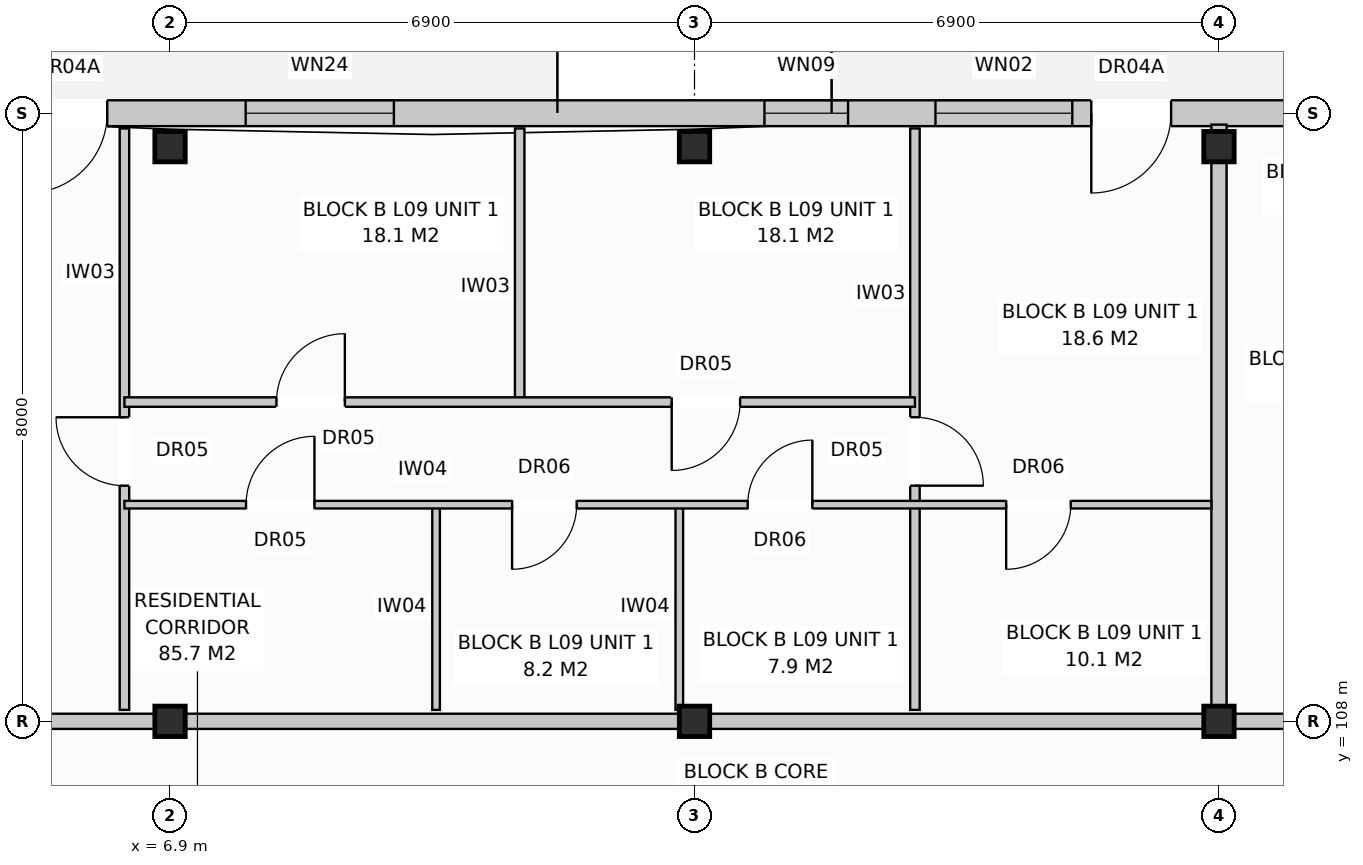
"""IFC4 building model, lengths in metres.
Left out: names, types, materials, properties, quantities, classifications, styles, units other than length and angle.
Written with IfcOpenShell. Run it as: python <this file> out.ifc"""

import sys

from ifc_helpers import new_model, si_unit, direction, frame, frame_2d, origin, origin_with_axes, origin_2d, place, context, subcontext, project, spatial, rectangle, extrude, element, fill, save


model = new_model("IFC4")
c1 = context("Model", 3, precision=1e-05, world=origin(), true_north=direction((0.0, 1.0)))
c2 = subcontext(c1, "Body", "Model", "MODEL_VIEW")
j1 = project(units=[si_unit("LENGTHUNIT", "METRE"), si_unit("PLANEANGLEUNIT", "RADIAN")], contexts=[c1])
p1 = place(None, origin())
s1 = spatial("IfcSite", under=j1, at=p1, CompositionType="ELEMENT")
p2 = place(p1, origin())
s2 = spatial("IfcBuilding", under=s1, at=p2, CompositionType="ELEMENT")
p3 = place(p2, frame((0.0, 0.0, 30.4)))
s3 = spatial("IfcBuildingStorey", under=s2, at=p3, CompositionType="ELEMENT", Elevation=30.4)
for number, where, z_axis, x_axis in (
    (1, (6.9, 108.0, 0.0), (0.0, 0.0, 1.0), (1.0, 0.0, 0.0)),
    (2, (6.9, 115.56, 0.0), (0.0, 0.0, 1.0), (1.0, 0.0, 0.0)),
    (3, (13.8, 108.0, 0.0), (0.0, 0.0, 1.0), (1.0, 0.0, 0.0)),
    (4, (13.8, 115.56, 0.0), (0.0, 0.0, 1.0), (1.0, 0.0, 0.0)),
    (5, (20.7, 108.0, 0.0), (0.0, 0.0, 1.0), (1.0, 0.0, 0.0)),
    (6, (20.7, 115.56, 0.0), (0.0, 0.0, 1.0), (1.0, 0.0, 0.0)),
):
    element("IfcColumn", number, at=place(p3, frame(where, z_axis=z_axis, x_axis=x_axis)), inside=s3, PredefinedType="COLUMN", context=c2, shape_type="SweptSolid", body=[
        extrude(rectangle(XDim=0.4, YDim=0.4, at=origin_2d()), origin(), (0.0, 0.0, 1.0), 3.2),
    ])
p4 = place(p3, frame((0.16, 116.0, 0.0), z_axis=(0.0, 0.0, 1.0), x_axis=(1.0, 0.0, 0.0)))
e7 = element("IfcWall", 7, at=p4, inside=s3, PredefinedType="STANDARD", context=c2, shape_type="SweptSolid", body=[
    extrude(rectangle(XDim=41.08, YDim=0.34, at=frame_2d((20.54, 0.0))), origin(), (0.0, 0.0, 1.0), 2.96),
])
p5 = place(p4, frame((4.864, 0.0, 0.0)))
e8 = element("IfcOpeningElement", 8, at=p5, cuts=e7, PredefinedType="OPENING", context=c2, shape_type="SweptSolid", body=[
    extrude(rectangle(XDim=1.05, YDim=2.12, at=frame_2d((0.525, 1.06))), frame((0.0, 0.182, 0.0), z_axis=(0.0, -1.0, 0.0), x_axis=(1.0, 0.0, 0.0)), (0.0, 0.0, 1.0), 0.364),
])
p6 = place(p4, frame((18.86, 0.0, 0.0)))
e9 = element("IfcOpeningElement", 9, at=p6, cuts=e7, PredefinedType="OPENING", context=c2, shape_type="SweptSolid", body=[
    extrude(rectangle(XDim=1.05, YDim=2.12, at=frame_2d((0.525, 1.06))), frame((0.0, 0.182, 0.0), z_axis=(0.0, -1.0, 0.0), x_axis=(1.0, 0.0, 0.0)), (0.0, 0.0, 1.0), 0.364),
])
p7 = place(p4, frame((30.364, 0.0, 0.0)))
e10 = element("IfcOpeningElement", 10, at=p7, cuts=e7, PredefinedType="OPENING", context=c2, shape_type="SweptSolid", body=[
    extrude(rectangle(XDim=1.05, YDim=2.12, at=frame_2d((0.525, 1.06))), frame((0.0, 0.182, 0.0), z_axis=(0.0, -1.0, 0.0), x_axis=(1.0, 0.0, 0.0)), (0.0, 0.0, 1.0), 0.364),
])
p8 = place(p4, frame((2.46, 0.0, 0.72)))
e11 = element("IfcOpeningElement", 11, at=p8, cuts=e7, PredefinedType="OPENING", context=c2, shape_type="SweptSolid", body=[
    extrude(rectangle(XDim=1.1, YDim=1.5, at=frame_2d((0.55, 0.75))), frame((0.0, 0.182, 0.0), z_axis=(0.0, -1.0, 0.0), x_axis=(1.0, 0.0, 0.0)), (0.0, 0.0, 1.0), 0.364),
])
p9 = place(p4, frame((7.735, 0.0, 0.8)))
e12 = element("IfcOpeningElement", 12, at=p9, cuts=e7, PredefinedType="OPENING", context=c2, shape_type="SweptSolid", body=[
    extrude(rectangle(XDim=1.95, YDim=1.65, at=frame_2d((0.975, 0.825))), frame((0.0, 0.182, 0.0), z_axis=(0.0, -1.0, 0.0), x_axis=(1.0, 0.0, 0.0)), (0.0, 0.0, 1.0), 0.364),
])
p10 = place(p4, frame((14.56, 0.0, 0.72)))
e13 = element("IfcOpeningElement", 13, at=p10, cuts=e7, PredefinedType="OPENING", context=c2, shape_type="SweptSolid", body=[
    extrude(rectangle(XDim=1.1, YDim=1.5, at=frame_2d((0.55, 0.75))), frame((0.0, 0.182, 0.0), z_axis=(0.0, -1.0, 0.0), x_axis=(1.0, 0.0, 0.0)), (0.0, 0.0, 1.0), 0.364),
])
p11 = place(p4, frame((16.81, 0.0, 0.8)))
e14 = element("IfcOpeningElement", 14, at=p11, cuts=e7, PredefinedType="OPENING", context=c2, shape_type="SweptSolid", body=[
    extrude(rectangle(XDim=1.8, YDim=1.7, at=frame_2d((0.9, 0.85))), frame((0.0, 0.182, 0.0), z_axis=(0.0, -1.0, 0.0), x_axis=(1.0, 0.0, 0.0)), (0.0, 0.0, 1.0), 0.364),
])
p12 = place(p4, frame((21.535, 0.0, 0.8)))
e15 = element("IfcOpeningElement", 15, at=p12, cuts=e7, PredefinedType="OPENING", context=c2, shape_type="SweptSolid", body=[
    extrude(rectangle(XDim=1.95, YDim=1.65, at=frame_2d((0.975, 0.825))), frame((0.0, 0.182, 0.0), z_axis=(0.0, -1.0, 0.0), x_axis=(1.0, 0.0, 0.0)), (0.0, 0.0, 1.0), 0.364),
])
p13 = place(p4, frame((25.36, 0.0, 0.72)))
e16 = element("IfcOpeningElement", 16, at=p13, cuts=e7, PredefinedType="OPENING", context=c2, shape_type="SweptSolid", body=[
    extrude(rectangle(XDim=1.1, YDim=1.5, at=frame_2d((0.55, 0.75))), frame((0.0, 0.182, 0.0), z_axis=(0.0, -1.0, 0.0), x_axis=(1.0, 0.0, 0.0)), (0.0, 0.0, 1.0), 0.364),
])
p14 = place(p4, frame((28.66, 0.0, 0.72)))
e17 = element("IfcOpeningElement", 17, at=p14, cuts=e7, PredefinedType="OPENING", context=c2, shape_type="SweptSolid", body=[
    extrude(rectangle(XDim=1.1, YDim=1.5, at=frame_2d((0.55, 0.75))), frame((0.0, 0.182, 0.0), z_axis=(0.0, -1.0, 0.0), x_axis=(1.0, 0.0, 0.0)), (0.0, 0.0, 1.0), 0.364),
])
p15 = place(p4, frame((31.935, 0.0, 0.8)))
e18 = element("IfcOpeningElement", 18, at=p15, cuts=e7, PredefinedType="OPENING", context=c2, shape_type="SweptSolid", body=[
    extrude(rectangle(XDim=1.95, YDim=1.65, at=frame_2d((0.975, 0.825))), frame((0.0, 0.182, 0.0), z_axis=(0.0, -1.0, 0.0), x_axis=(1.0, 0.0, 0.0)), (0.0, 0.0, 1.0), 0.364),
])
p16 = place(p4, frame((38.06, 0.0, 0.72)))
e19 = element("IfcOpeningElement", 19, at=p16, cuts=e7, PredefinedType="OPENING", context=c2, shape_type="SweptSolid", body=[
    extrude(rectangle(XDim=1.1, YDim=1.5, at=frame_2d((0.55, 0.75))), frame((0.0, 0.182, 0.0), z_axis=(0.0, -1.0, 0.0), x_axis=(1.0, 0.0, 0.0)), (0.0, 0.0, 1.0), 0.364),
])
p17 = place(p3, frame((20.7, 108.15, 0.0), z_axis=(0.0, 0.0, 1.0), x_axis=(0.0, 1.0, 0.0)))
e20 = element("IfcWall", 20, at=p17, inside=s3, PredefinedType="PARTITIONING", context=c2, shape_type="SweptSolid", body=[
    extrude(rectangle(XDim=7.7, YDim=0.2, at=frame_2d((3.85, 0.0))), origin(), (0.0, 0.0, 1.0), 2.96),
])
p18 = place(p3, frame((0.0, 108.0, 0.0), z_axis=(0.0, 0.0, 1.0), x_axis=(1.0, 0.0, 0.0)))
e21 = element("IfcWall", 21, at=p18, inside=s3, PredefinedType="PARTITIONING", context=c2, shape_type="SweptSolid", body=[
    extrude(rectangle(XDim=20.7, YDim=0.2, at=frame_2d((10.35, 0.0))), origin(), (0.0, 0.0, 1.0), 2.4),
])
p19 = place(p18, frame((2.4, 0.0, 0.0)))
e22 = element("IfcOpeningElement", 22, at=p19, cuts=e21, PredefinedType="OPENING", context=c2, shape_type="SweptSolid", body=[
    extrude(rectangle(XDim=0.95, YDim=2.15, at=frame_2d((0.475, 1.075))), frame((0.0, 0.112, 0.0), z_axis=(0.0, -1.0, 0.0), x_axis=(1.0, 0.0, 0.0)), (0.0, 0.0, 1.0), 0.224),
])
p20 = place(p3, frame((6.3, 108.15, 0.0), z_axis=(0.0, 0.0, 1.0), x_axis=(0.0, 1.0, 0.0)))
e23 = element("IfcWall", 23, at=p20, inside=s3, PredefinedType="PARTITIONING", context=c2, shape_type="SweptSolid", body=[
    extrude(rectangle(XDim=7.65, YDim=0.125, at=frame_2d((3.825, 0.0))), origin(), (0.0, 0.0, 1.0), 2.96),
])
p21 = place(p20, frame((2.95, 0.0, 0.0)))
e24 = element("IfcOpeningElement", 24, at=p21, cuts=e23, PredefinedType="OPENING", context=c2, shape_type="SweptSolid", body=[
    extrude(rectangle(XDim=0.9, YDim=2.1, at=frame_2d((0.45, 1.05))), frame((0.0, 0.074, 0.0), z_axis=(0.0, -1.0, 0.0), x_axis=(1.0, 0.0, 0.0)), (0.0, 0.0, 1.0), 0.149),
])
for number, where, z_axis, x_axis in (
    (25, (10.4, 108.15, 0.0), (0.0, 0.0, 1.0), (0.0, 1.0, 0.0)),
    (26, (13.6, 108.15, 0.0), (0.0, 0.0, 1.0), (0.0, 1.0, 0.0)),
):
    element("IfcWall", number, at=place(p3, frame(where, z_axis=z_axis, x_axis=x_axis)), inside=s3, PredefinedType="PARTITIONING", context=c2, shape_type="SweptSolid", body=[
        extrude(rectangle(XDim=2.7, YDim=0.1, at=frame_2d((1.35, 0.0))), origin(), (0.0, 0.0, 1.0), 2.96),
    ])
p22 = place(p3, frame((11.5, 112.2, 0.0), z_axis=(0.0, 0.0, 1.0), x_axis=(0.0, 1.0, 0.0)))
e27 = element("IfcWall", 27, at=p22, inside=s3, PredefinedType="PARTITIONING", context=c2, shape_type="SweptSolid", body=[
    extrude(rectangle(XDim=3.6, YDim=0.125, at=frame_2d((1.8, 0.0))), origin(), (0.0, 0.0, 1.0), 2.59),
])
p23 = place(p3, frame((16.7, 108.15, 0.0), z_axis=(0.0, 0.0, 1.0), x_axis=(0.0, 1.0, 0.0)))
e28 = element("IfcWall", 28, at=p23, inside=s3, PredefinedType="PARTITIONING", context=c2, shape_type="SweptSolid", body=[
    extrude(rectangle(XDim=7.65, YDim=0.125, at=frame_2d((3.825, 0.0))), origin(), (0.0, 0.0, 1.0), 2.96),
])
p24 = place(p23, frame((2.95, 0.0, 0.0)))
e29 = element("IfcOpeningElement", 29, at=p24, cuts=e28, PredefinedType="OPENING", context=c2, shape_type="SweptSolid", body=[
    extrude(rectangle(XDim=0.9, YDim=2.1, at=frame_2d((0.45, 1.05))), frame((0.0, 0.074, 0.0), z_axis=(0.0, -1.0, 0.0), x_axis=(1.0, 0.0, 0.0)), (0.0, 0.0, 1.0), 0.149),
])
p25 = place(p3, frame((6.3, 110.85, 0.0), z_axis=(0.0, 0.0, 1.0), x_axis=(1.0, 0.0, 0.0)))
e30 = element("IfcWall", 30, at=p25, inside=s3, PredefinedType="PARTITIONING", context=c2, shape_type="SweptSolid", body=[
    extrude(rectangle(XDim=14.3, YDim=0.1, at=frame_2d((7.15, 0.0))), origin(), (0.0, 0.0, 1.0), 2.96),
])
p26 = place(p25, frame((1.6, 0.0, 0.0)))
e31 = element("IfcOpeningElement", 31, at=p26, cuts=e30, PredefinedType="OPENING", context=c2, shape_type="SweptSolid", body=[
    extrude(rectangle(XDim=0.9, YDim=2.1, at=frame_2d((0.45, 1.05))), frame((0.0, 0.062, 0.0), z_axis=(0.0, -1.0, 0.0), x_axis=(1.0, 0.0, 0.0)), (0.0, 0.0, 1.0), 0.124),
])
p27 = place(p25, frame((5.1, 0.0, 0.0)))
e32 = element("IfcOpeningElement", 32, at=p27, cuts=e30, PredefinedType="OPENING", context=c2, shape_type="SweptSolid", body=[
    extrude(rectangle(XDim=0.85, YDim=2.05, at=frame_2d((0.425, 1.025))), frame((0.0, 0.062, 0.0), z_axis=(0.0, -1.0, 0.0), x_axis=(1.0, 0.0, 0.0)), (0.0, 0.0, 1.0), 0.124),
])
p28 = place(p25, frame((8.2, 0.0, 0.0)))
e33 = element("IfcOpeningElement", 33, at=p28, cuts=e30, PredefinedType="OPENING", context=c2, shape_type="SweptSolid", body=[
    extrude(rectangle(XDim=0.85, YDim=2.05, at=frame_2d((0.425, 1.025))), frame((0.0, 0.062, 0.0), z_axis=(0.0, -1.0, 0.0), x_axis=(1.0, 0.0, 0.0)), (0.0, 0.0, 1.0), 0.124),
])
p29 = place(p25, frame((11.6, 0.0, 0.0)))
e34 = element("IfcOpeningElement", 34, at=p29, cuts=e30, PredefinedType="OPENING", context=c2, shape_type="SweptSolid", body=[
    extrude(rectangle(XDim=0.85, YDim=2.05, at=frame_2d((0.425, 1.025))), frame((0.0, 0.062, 0.0), z_axis=(0.0, -1.0, 0.0), x_axis=(1.0, 0.0, 0.0)), (0.0, 0.0, 1.0), 0.124),
])
p30 = place(p3, frame((6.3, 112.2, 0.0), z_axis=(0.0, 0.0, 1.0), x_axis=(1.0, 0.0, 0.0)))
e35 = element("IfcWall", 35, at=p30, inside=s3, PredefinedType="PARTITIONING", context=c2, shape_type="SweptSolid", body=[
    extrude(rectangle(XDim=10.4, YDim=0.125, at=frame_2d((5.2, 0.0))), origin(), (0.0, 0.0, 1.0), 2.96),
])
p31 = place(p30, frame((2.0, 0.0, 0.0)))
e36 = element("IfcOpeningElement", 36, at=p31, cuts=e35, PredefinedType="OPENING", context=c2, shape_type="SweptSolid", body=[
    extrude(rectangle(XDim=0.9, YDim=2.1, at=frame_2d((0.45, 1.05))), frame((0.0, 0.074, 0.0), z_axis=(0.0, -1.0, 0.0), x_axis=(1.0, 0.0, 0.0)), (0.0, 0.0, 1.0), 0.149),
])
p32 = place(p30, frame((7.2, 0.0, 0.0)))
e37 = element("IfcOpeningElement", 37, at=p32, cuts=e35, PredefinedType="OPENING", context=c2, shape_type="SweptSolid", body=[
    extrude(rectangle(XDim=0.9, YDim=2.1, at=frame_2d((0.45, 1.05))), frame((0.0, 0.074, 0.0), z_axis=(0.0, -1.0, 0.0), x_axis=(1.0, 0.0, 0.0)), (0.0, 0.0, 1.0), 0.149),
])
p33 = place(p3, frame((20.7, 108.0, 0.0), z_axis=(0.0, 0.0, 1.0), x_axis=(1.0, 0.0, 0.0)))
e38 = element("IfcWall", 38, at=p33, inside=s3, PredefinedType="PARTITIONING", context=c2, shape_type="SweptSolid", body=[
    extrude(rectangle(XDim=6.9, YDim=0.2, at=frame_2d((3.45, 0.0))), origin(), (0.0, 0.0, 1.0), 2.4),
])
p34 = place(p33, frame((2.0, 0.0, 0.0)))
e39 = element("IfcOpeningElement", 39, at=p34, cuts=e38, PredefinedType="OPENING", context=c2, shape_type="SweptSolid", body=[
    extrude(rectangle(XDim=0.95, YDim=2.15, at=frame_2d((0.475, 1.075))), frame((0.0, 0.112, 0.0), z_axis=(0.0, -1.0, 0.0), x_axis=(1.0, 0.0, 0.0)), (0.0, 0.0, 1.0), 0.224),
])
p35 = place(p5, frame((1.05, 0.0, 0.0), z_axis=(0.0, 0.0, 1.0), x_axis=(-1.0, 0.0, 0.0)))
e40 = element("IfcDoor", 40, at=p35, inside=s3, OperationType="SINGLE_SWING_LEFT", PredefinedType="DOOR", context=c2, shape_type="SweptSolid", body=[
    extrude(rectangle(XDim=1.05, YDim=2.12, at=frame_2d((0.525, 1.06))), frame((0.0, 0.025, 0.0), z_axis=(0.0, -1.0, 0.0), x_axis=(1.0, 0.0, 0.0)), (0.0, 0.0, 1.0), 0.05),
])
fill(e8, e40)
p36 = place(p6, frame((1.05, 0.0, 0.0), z_axis=(0.0, 0.0, 1.0), x_axis=(-1.0, 0.0, 0.0)))
e41 = element("IfcDoor", 41, at=p36, inside=s3, OperationType="SINGLE_SWING_LEFT", PredefinedType="DOOR", context=c2, shape_type="SweptSolid", body=[
    extrude(rectangle(XDim=1.05, YDim=2.12, at=frame_2d((0.525, 1.06))), frame((0.0, 0.025, 0.0), z_axis=(0.0, -1.0, 0.0), x_axis=(1.0, 0.0, 0.0)), (0.0, 0.0, 1.0), 0.05),
])
fill(e9, e41)
p37 = place(p9, origin_with_axes())
e42 = element("IfcWindow", 42, at=p37, inside=s3, PartitioningType="SINGLE_PANEL", PredefinedType="WINDOW", context=c2, shape_type="SweptSolid", body=[
    extrude(rectangle(XDim=1.95, YDim=1.65, at=frame_2d((0.975, 0.825))), frame((0.0, 0.03, 0.0), z_axis=(0.0, -1.0, 0.0), x_axis=(1.0, 0.0, 0.0)), (0.0, 0.0, 1.0), 0.06),
])
fill(e12, e42)
p38 = place(p10, origin_with_axes())
e43 = element("IfcWindow", 43, at=p38, inside=s3, PartitioningType="SINGLE_PANEL", PredefinedType="WINDOW", context=c2, shape_type="SweptSolid", body=[
    extrude(rectangle(XDim=1.1, YDim=1.5, at=frame_2d((0.55, 0.75))), frame((0.0, 0.03, 0.0), z_axis=(0.0, -1.0, 0.0), x_axis=(1.0, 0.0, 0.0)), (0.0, 0.0, 1.0), 0.06),
])
fill(e13, e43)
p39 = place(p11, origin_with_axes())
e44 = element("IfcWindow", 44, at=p39, inside=s3, PartitioningType="SINGLE_PANEL", PredefinedType="WINDOW", context=c2, shape_type="SweptSolid", body=[
    extrude(rectangle(XDim=1.8, YDim=1.7, at=frame_2d((0.9, 0.85))), frame((0.0, 0.03, 0.0), z_axis=(0.0, -1.0, 0.0), x_axis=(1.0, 0.0, 0.0)), (0.0, 0.0, 1.0), 0.06),
])
fill(e14, e44)
p40 = place(p21, origin_with_axes())
e45 = element("IfcDoor", 45, at=p40, inside=s3, OperationType="SINGLE_SWING_RIGHT", PredefinedType="DOOR", context=c2, shape_type="SweptSolid", body=[
    extrude(rectangle(XDim=0.9, YDim=2.1, at=frame_2d((0.45, 1.05))), frame((0.0, 0.025, 0.0), z_axis=(0.0, -1.0, 0.0), x_axis=(1.0, 0.0, 0.0)), (0.0, 0.0, 1.0), 0.05),
])
fill(e24, e45)
p41 = place(p24, frame((0.9, 0.0, 0.0), z_axis=(0.0, 0.0, 1.0), x_axis=(-1.0, 0.0, 0.0)))
e46 = element("IfcDoor", 46, at=p41, inside=s3, OperationType="SINGLE_SWING_LEFT", PredefinedType="DOOR", context=c2, shape_type="SweptSolid", body=[
    extrude(rectangle(XDim=0.9, YDim=2.1, at=frame_2d((0.45, 1.05))), frame((0.0, 0.025, 0.0), z_axis=(0.0, -1.0, 0.0), x_axis=(1.0, 0.0, 0.0)), (0.0, 0.0, 1.0), 0.05),
])
fill(e29, e46)
p42 = place(p26, origin_with_axes())
e47 = element("IfcDoor", 47, at=p42, inside=s3, OperationType="SINGLE_SWING_RIGHT", PredefinedType="DOOR", context=c2, shape_type="SweptSolid", body=[
    extrude(rectangle(XDim=0.9, YDim=2.1, at=frame_2d((0.45, 1.05))), frame((0.0, 0.025, 0.0), z_axis=(0.0, -1.0, 0.0), x_axis=(1.0, 0.0, 0.0)), (0.0, 0.0, 1.0), 0.05),
])
fill(e31, e47)
p43 = place(p27, frame((0.85, 0.0, 0.0), z_axis=(0.0, 0.0, 1.0), x_axis=(-1.0, 0.0, 0.0)))
e48 = element("IfcDoor", 48, at=p43, inside=s3, OperationType="SINGLE_SWING_LEFT", PredefinedType="DOOR", context=c2, shape_type="SweptSolid", body=[
    extrude(rectangle(XDim=0.85, YDim=2.05, at=frame_2d((0.425, 1.025))), frame((0.0, 0.025, 0.0), z_axis=(0.0, -1.0, 0.0), x_axis=(1.0, 0.0, 0.0)), (0.0, 0.0, 1.0), 0.05),
])
fill(e32, e48)
p44 = place(p28, origin_with_axes())
e49 = element("IfcDoor", 49, at=p44, inside=s3, OperationType="SINGLE_SWING_RIGHT", PredefinedType="DOOR", context=c2, shape_type="SweptSolid", body=[
    extrude(rectangle(XDim=0.85, YDim=2.05, at=frame_2d((0.425, 1.025))), frame((0.0, 0.025, 0.0), z_axis=(0.0, -1.0, 0.0), x_axis=(1.0, 0.0, 0.0)), (0.0, 0.0, 1.0), 0.05),
])
fill(e33, e49)
p45 = place(p29, frame((0.85, 0.0, 0.0), z_axis=(0.0, 0.0, 1.0), x_axis=(-1.0, 0.0, 0.0)))
e50 = element("IfcDoor", 50, at=p45, inside=s3, OperationType="SINGLE_SWING_LEFT", PredefinedType="DOOR", context=c2, shape_type="SweptSolid", body=[
    extrude(rectangle(XDim=0.85, YDim=2.05, at=frame_2d((0.425, 1.025))), frame((0.0, 0.025, 0.0), z_axis=(0.0, -1.0, 0.0), x_axis=(1.0, 0.0, 0.0)), (0.0, 0.0, 1.0), 0.05),
])
fill(e34, e50)
p46 = place(p31, origin_with_axes())
e51 = element("IfcDoor", 51, at=p46, inside=s3, OperationType="SINGLE_SWING_RIGHT", PredefinedType="DOOR", context=c2, shape_type="SweptSolid", body=[
    extrude(rectangle(XDim=0.9, YDim=2.1, at=frame_2d((0.45, 1.05))), frame((0.0, 0.025, 0.0), z_axis=(0.0, -1.0, 0.0), x_axis=(1.0, 0.0, 0.0)), (0.0, 0.0, 1.0), 0.05),
])
fill(e36, e51)
p47 = place(p32, frame((0.9, 0.0, 0.0), z_axis=(0.0, 0.0, 1.0), x_axis=(-1.0, 0.0, 0.0)))
e52 = element("IfcDoor", 52, at=p47, inside=s3, OperationType="SINGLE_SWING_LEFT", PredefinedType="DOOR", context=c2, shape_type="SweptSolid", body=[
    extrude(rectangle(XDim=0.9, YDim=2.1, at=frame_2d((0.45, 1.05))), frame((0.0, 0.025, 0.0), z_axis=(0.0, -1.0, 0.0), x_axis=(1.0, 0.0, 0.0)), (0.0, 0.0, 1.0), 0.05),
])
fill(e37, e52)
save(model, sys.argv[1])
